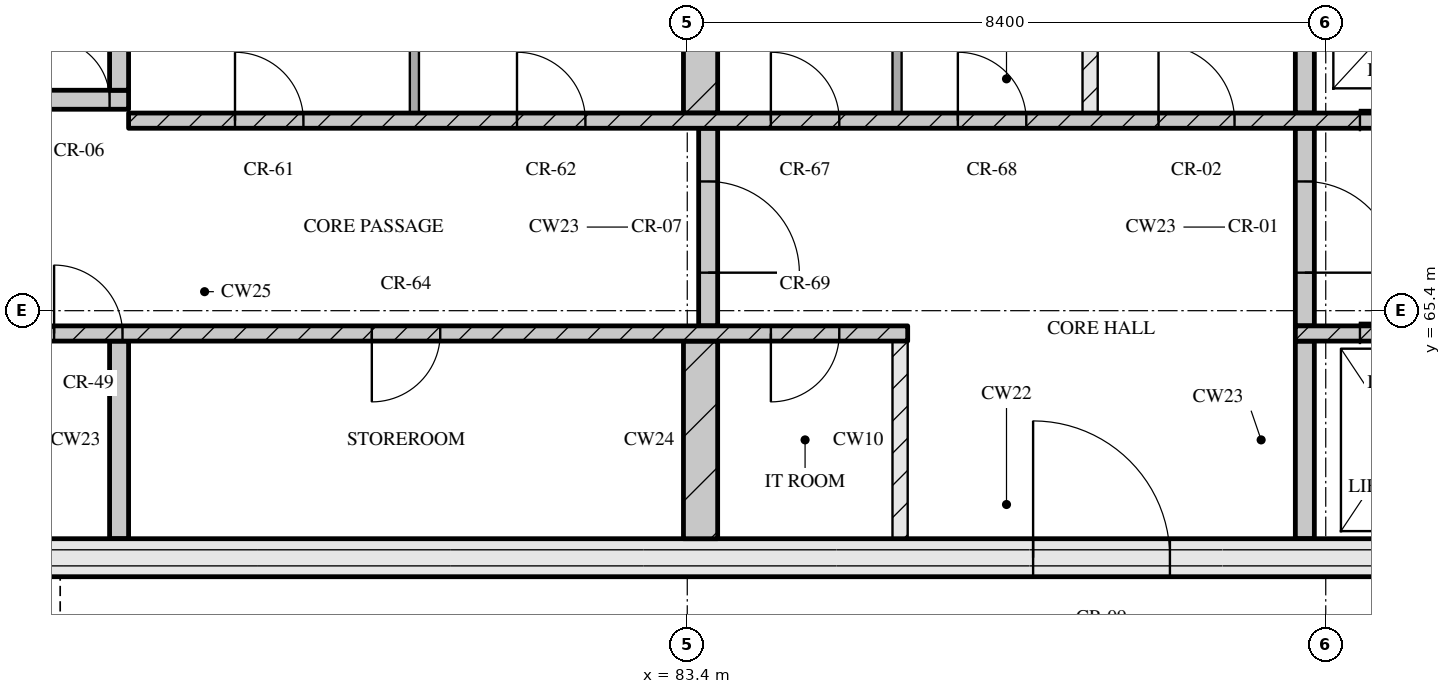
"""IFC4 building model, lengths in metres.
Left out: names, types, materials, properties, quantities, classifications, styles, units other than length and angle.
Written with IfcOpenShell. Run it as: python <this file> out.ifc"""

import sys

from ifc_helpers import new_model, si_unit, direction, frame, frame_2d, origin, place, context, subcontext, project, spatial, rectangle, extrude, element, fill, save


model = new_model("IFC4")
c1 = context("Model", 3, precision=1e-05, world=origin(), true_north=direction((0.0, 1.0)))
c2 = subcontext(c1, "Body", "Model", "MODEL_VIEW")
j1 = project(units=[si_unit("LENGTHUNIT", "METRE"), si_unit("PLANEANGLEUNIT", "RADIAN")], contexts=[c1])
p1 = place(None, origin())
s1 = spatial("IfcSite", under=j1, at=p1, CompositionType="ELEMENT")
p2 = place(p1, origin())
s2 = spatial("IfcBuilding", under=s1, at=p2, CompositionType="ELEMENT")
p3 = place(p2, frame((0.0, 0.0, 303.15)))
s3 = spatial("IfcBuildingStorey", under=s2, at=p3, CompositionType="ELEMENT", Elevation=303.15)
p4 = place(p3, frame((67.3, 62.15, 0.0), z_axis=(0.0, 0.0, 1.0), x_axis=(1.0, 0.0, 0.0)))
e1 = element("IfcWall", 1, at=p4, inside=s3, PredefinedType="SOLIDWALL", context=c2, shape_type="SweptSolid", body=[
    extrude(rectangle(XDim=40.6, YDim=0.5, at=frame_2d((20.3, 0.0))), origin(), (0.0, 0.0, 1.0), 3.32),
])
p5 = place(p4, frame((20.65, 0.0, 0.0)))
e2 = element("IfcOpeningElement", 2, at=p5, cuts=e1, PredefinedType="OPENING", context=c2, shape_type="SweptSolid", body=[
    extrude(rectangle(XDim=1.8, YDim=2.1, at=frame_2d((0.9, 1.05))), frame((0.0, 0.26, 0.0), z_axis=(0.0, -1.0, 0.0), x_axis=(1.0, 0.0, 0.0)), (0.0, 0.0, 1.0), 0.52),
])
p6 = place(p3, frame((75.925, 62.4, 0.0), z_axis=(0.0, 0.0, 1.0), x_axis=(0.0, 1.0, 0.0)))
e3 = element("IfcWall", 3, at=p6, inside=s3, PredefinedType="SOLIDWALL", context=c2, shape_type="SweptSolid", body=[
    extrude(rectangle(XDim=2.6, YDim=0.25, at=frame_2d((1.3, 0.0))), origin(), (0.0, 0.0, 1.0), 3.32),
])
p7 = place(p3, frame((83.575, 62.4, 0.0), z_axis=(0.0, 0.0, 1.0), x_axis=(0.0, 1.0, 0.0)))
e4 = element("IfcWall", 4, at=p7, inside=s3, PredefinedType="SOLIDWALL", context=c2, shape_type="SweptSolid", body=[
    extrude(rectangle(XDim=2.6, YDim=0.45, at=frame_2d((1.3, 0.0))), origin(), (0.0, 0.0, 1.0), 3.32),
])
p8 = place(p3, frame((86.2, 62.4, 0.0), z_axis=(0.0, 0.0, 1.0), x_axis=(0.0, 1.0, 0.0)))
e5 = element("IfcWall", 5, at=p8, inside=s3, PredefinedType="PARTITIONING", context=c2, shape_type="SweptSolid", body=[
    extrude(rectangle(XDim=2.6, YDim=0.2, at=frame_2d((1.3, 0.0))), origin(), (0.0, 0.0, 1.0), 3.32),
])
p9 = place(p3, frame((91.525, 62.4, 0.0), z_axis=(0.0, 0.0, 1.0), x_axis=(0.0, 1.0, 0.0)))
e6 = element("IfcWall", 6, at=p9, inside=s3, PredefinedType="SOLIDWALL", context=c2, shape_type="SweptSolid", body=[
    extrude(rectangle(XDim=2.6, YDim=0.25, at=frame_2d((1.3, 0.0))), origin(), (0.0, 0.0, 1.0), 3.32),
])
p10 = place(p3, frame((67.8, 65.1, 0.0), z_axis=(0.0, 0.0, 1.0), x_axis=(1.0, 0.0, 0.0)))
e7 = element("IfcWall", 7, at=p10, inside=s3, PredefinedType="SOLIDWALL", context=c2, shape_type="SweptSolid", body=[
    extrude(rectangle(XDim=18.5, YDim=0.2, at=frame_2d((9.25, 0.0))), origin(), (0.0, 0.0, 1.0), 3.32),
])
p11 = place(p10, frame((7.27, 0.0, 0.0)))
e8 = element("IfcOpeningElement", 8, at=p11, cuts=e7, PredefinedType="OPENING", context=c2, shape_type="SweptSolid", body=[
    extrude(rectangle(XDim=0.9, YDim=2.1, at=frame_2d((0.45, 1.05))), frame((0.0, 0.11, 0.0), z_axis=(0.0, -1.0, 0.0), x_axis=(1.0, 0.0, 0.0)), (0.0, 0.0, 1.0), 0.22),
])
p12 = place(p10, frame((11.45, 0.0, 0.0)))
e9 = element("IfcOpeningElement", 9, at=p12, cuts=e7, PredefinedType="OPENING", context=c2, shape_type="SweptSolid", body=[
    extrude(rectangle(XDim=0.9, YDim=2.1, at=frame_2d((0.45, 1.05))), frame((0.0, 0.11, 0.0), z_axis=(0.0, -1.0, 0.0), x_axis=(1.0, 0.0, 0.0)), (0.0, 0.0, 1.0), 0.22),
])
p13 = place(p10, frame((16.7, 0.0, 0.0)))
e10 = element("IfcOpeningElement", 10, at=p13, cuts=e7, PredefinedType="OPENING", context=c2, shape_type="SweptSolid", body=[
    extrude(rectangle(XDim=0.9, YDim=2.1, at=frame_2d((0.45, 1.05))), frame((0.0, 0.11, 0.0), z_axis=(0.0, -1.0, 0.0), x_axis=(1.0, 0.0, 0.0)), (0.0, 0.0, 1.0), 0.22),
])
p14 = place(p3, frame((91.4, 65.1, 0.0), z_axis=(0.0, 0.0, 1.0), x_axis=(1.0, 0.0, 0.0)))
e11 = element("IfcWall", 11, at=p14, inside=s3, PredefinedType="SOLIDWALL", context=c2, shape_type="SweptSolid", body=[
    extrude(rectangle(XDim=16.0, YDim=0.2, at=frame_2d((8.0, 0.0))), origin(), (0.0, 0.0, 1.0), 3.32),
])
p15 = place(p14, frame((0.85, 0.0, 0.0)))
e12 = element("IfcOpeningElement", 12, at=p15, cuts=e11, PredefinedType="OPENING", context=c2, shape_type="SweptSolid", body=[
    extrude(rectangle(XDim=1.1, YDim=2.1, at=frame_2d((0.55, 1.05))), frame((0.0, 0.11, 0.0), z_axis=(0.0, -1.0, 0.0), x_axis=(1.0, 0.0, 0.0)), (0.0, 0.0, 1.0), 0.22),
])
p16 = place(p14, frame((3.35, 0.0, 0.0)))
e13 = element("IfcOpeningElement", 13, at=p16, cuts=e11, PredefinedType="OPENING", context=c2, shape_type="SweptSolid", body=[
    extrude(rectangle(XDim=1.1, YDim=2.1, at=frame_2d((0.55, 1.05))), frame((0.0, 0.11, 0.0), z_axis=(0.0, -1.0, 0.0), x_axis=(1.0, 0.0, 0.0)), (0.0, 0.0, 1.0), 0.22),
])
p17 = place(p14, frame((5.85, 0.0, 0.0)))
e14 = element("IfcOpeningElement", 14, at=p17, cuts=e11, PredefinedType="OPENING", context=c2, shape_type="SweptSolid", body=[
    extrude(rectangle(XDim=1.1, YDim=2.1, at=frame_2d((0.55, 1.05))), frame((0.0, 0.11, 0.0), z_axis=(0.0, -1.0, 0.0), x_axis=(1.0, 0.0, 0.0)), (0.0, 0.0, 1.0), 0.22),
])
p18 = place(p14, frame((7.83, 0.0, 0.0)))
e15 = element("IfcOpeningElement", 15, at=p18, cuts=e11, PredefinedType="OPENING", context=c2, shape_type="SweptSolid", body=[
    extrude(rectangle(XDim=0.9, YDim=2.1, at=frame_2d((0.45, 1.05))), frame((0.0, 0.11, 0.0), z_axis=(0.0, -1.0, 0.0), x_axis=(1.0, 0.0, 0.0)), (0.0, 0.0, 1.0), 0.22),
])
p19 = place(p3, frame((83.675, 65.2, 0.0), z_axis=(0.0, 0.0, 1.0), x_axis=(0.0, 1.0, 0.0)))
e16 = element("IfcWall", 16, at=p19, inside=s3, PredefinedType="SOLIDWALL", context=c2, shape_type="SweptSolid", body=[
    extrude(rectangle(XDim=2.6, YDim=0.25, at=frame_2d((1.3, 0.0))), origin(), (0.0, 0.0, 1.0), 3.32),
])
p20 = place(p19, frame((0.7, 0.0, 0.0)))
e17 = element("IfcOpeningElement", 17, at=p20, cuts=e16, PredefinedType="OPENING", context=c2, shape_type="SweptSolid", body=[
    extrude(rectangle(XDim=1.2, YDim=2.1, at=frame_2d((0.6, 1.05))), frame((0.0, 0.135, 0.0), z_axis=(0.0, -1.0, 0.0), x_axis=(1.0, 0.0, 0.0)), (0.0, 0.0, 1.0), 0.27),
])
p21 = place(p3, frame((91.525, 65.2, 0.0), z_axis=(0.0, 0.0, 1.0), x_axis=(0.0, 1.0, 0.0)))
e18 = element("IfcWall", 18, at=p21, inside=s3, PredefinedType="SOLIDWALL", context=c2, shape_type="SweptSolid", body=[
    extrude(rectangle(XDim=2.6, YDim=0.25, at=frame_2d((1.3, 0.0))), origin(), (0.0, 0.0, 1.0), 3.32),
])
p22 = place(p21, frame((0.7, 0.0, 0.0)))
e19 = element("IfcOpeningElement", 19, at=p22, cuts=e18, PredefinedType="OPENING", context=c2, shape_type="SweptSolid", body=[
    extrude(rectangle(XDim=1.2, YDim=2.1, at=frame_2d((0.6, 1.05))), frame((0.0, 0.135, 0.0), z_axis=(0.0, -1.0, 0.0), x_axis=(1.0, 0.0, 0.0)), (0.0, 0.0, 1.0), 0.27),
])
p23 = place(p3, frame((76.05, 67.9, 0.0), z_axis=(0.0, 0.0, 1.0), x_axis=(1.0, 0.0, 0.0)))
e20 = element("IfcWall", 20, at=p23, inside=s3, PredefinedType="SOLIDWALL", context=c2, shape_type="SweptSolid", body=[
    extrude(rectangle(XDim=23.1, YDim=0.2, at=frame_2d((11.55, 0.0))), origin(), (0.0, 0.0, 1.0), 3.32),
])
p24 = place(p23, frame((1.4, 0.0, 0.0)))
e21 = element("IfcOpeningElement", 21, at=p24, cuts=e20, PredefinedType="OPENING", context=c2, shape_type="SweptSolid", body=[
    extrude(rectangle(XDim=0.9, YDim=2.1, at=frame_2d((0.45, 1.05))), frame((0.0, 0.11, 0.0), z_axis=(0.0, -1.0, 0.0), x_axis=(1.0, 0.0, 0.0)), (0.0, 0.0, 1.0), 0.22),
])
p25 = place(p23, frame((5.11, 0.0, 0.0)))
e22 = element("IfcOpeningElement", 22, at=p25, cuts=e20, PredefinedType="OPENING", context=c2, shape_type="SweptSolid", body=[
    extrude(rectangle(XDim=0.9, YDim=2.1, at=frame_2d((0.45, 1.05))), frame((0.0, 0.11, 0.0), z_axis=(0.0, -1.0, 0.0), x_axis=(1.0, 0.0, 0.0)), (0.0, 0.0, 1.0), 0.22),
])
p26 = place(p23, frame((8.45, 0.0, 0.0)))
e23 = element("IfcOpeningElement", 23, at=p26, cuts=e20, PredefinedType="OPENING", context=c2, shape_type="SweptSolid", body=[
    extrude(rectangle(XDim=0.9, YDim=2.1, at=frame_2d((0.45, 1.05))), frame((0.0, 0.11, 0.0), z_axis=(0.0, -1.0, 0.0), x_axis=(1.0, 0.0, 0.0)), (0.0, 0.0, 1.0), 0.22),
])
p27 = place(p23, frame((10.91, 0.0, 0.0)))
e24 = element("IfcOpeningElement", 24, at=p27, cuts=e20, PredefinedType="OPENING", context=c2, shape_type="SweptSolid", body=[
    extrude(rectangle(XDim=0.9, YDim=2.1, at=frame_2d((0.45, 1.05))), frame((0.0, 0.11, 0.0), z_axis=(0.0, -1.0, 0.0), x_axis=(1.0, 0.0, 0.0)), (0.0, 0.0, 1.0), 0.22),
])
p28 = place(p23, frame((13.55, 0.0, 0.0)))
e25 = element("IfcOpeningElement", 25, at=p28, cuts=e20, PredefinedType="OPENING", context=c2, shape_type="SweptSolid", body=[
    extrude(rectangle(XDim=1.0, YDim=2.1, at=frame_2d((0.5, 1.05))), frame((0.0, 0.11, 0.0), z_axis=(0.0, -1.0, 0.0), x_axis=(1.0, 0.0, 0.0)), (0.0, 0.0, 1.0), 0.22),
])
p29 = place(p23, frame((16.2, 0.0, 0.0)))
e26 = element("IfcOpeningElement", 26, at=p29, cuts=e20, PredefinedType="OPENING", context=c2, shape_type="SweptSolid", body=[
    extrude(rectangle(XDim=1.1, YDim=2.1, at=frame_2d((0.55, 1.05))), frame((0.0, 0.11, 0.0), z_axis=(0.0, -1.0, 0.0), x_axis=(1.0, 0.0, 0.0)), (0.0, 0.0, 1.0), 0.22),
])
p30 = place(p23, frame((18.7, 0.0, 0.0)))
e27 = element("IfcOpeningElement", 27, at=p30, cuts=e20, PredefinedType="OPENING", context=c2, shape_type="SweptSolid", body=[
    extrude(rectangle(XDim=1.1, YDim=2.1, at=frame_2d((0.55, 1.05))), frame((0.0, 0.11, 0.0), z_axis=(0.0, -1.0, 0.0), x_axis=(1.0, 0.0, 0.0)), (0.0, 0.0, 1.0), 0.22),
])
p31 = place(p23, frame((21.2, 0.0, 0.0)))
e28 = element("IfcOpeningElement", 28, at=p31, cuts=e20, PredefinedType="OPENING", context=c2, shape_type="SweptSolid", body=[
    extrude(rectangle(XDim=1.1, YDim=2.1, at=frame_2d((0.55, 1.05))), frame((0.0, 0.11, 0.0), z_axis=(0.0, -1.0, 0.0), x_axis=(1.0, 0.0, 0.0)), (0.0, 0.0, 1.0), 0.22),
])
p32 = place(p3, frame((79.81, 68.0, 0.0), z_axis=(0.0, 0.0, 1.0), x_axis=(0.0, 1.0, 0.0)))
e29 = element("IfcWall", 29, at=p32, inside=s3, PredefinedType="PARTITIONING", context=c2, shape_type="SweptSolid", body=[
    extrude(rectangle(XDim=2.6, YDim=0.12, at=frame_2d((1.3, 0.0))), origin(), (0.0, 0.0, 1.0), 3.32),
])
p33 = place(p3, frame((83.575, 68.0, 0.0), z_axis=(0.0, 0.0, 1.0), x_axis=(0.0, 1.0, 0.0)))
e30 = element("IfcWall", 30, at=p33, inside=s3, PredefinedType="SOLIDWALL", context=c2, shape_type="SweptSolid", body=[
    extrude(rectangle(XDim=2.6, YDim=0.45, at=frame_2d((1.3, 0.0))), origin(), (0.0, 0.0, 1.0), 3.32),
])
p34 = place(p3, frame((86.16, 68.0, 0.0), z_axis=(0.0, 0.0, 1.0), x_axis=(0.0, 1.0, 0.0)))
e31 = element("IfcWall", 31, at=p34, inside=s3, PredefinedType="PARTITIONING", context=c2, shape_type="SweptSolid", body=[
    extrude(rectangle(XDim=2.6, YDim=0.12, at=frame_2d((1.3, 0.0))), origin(), (0.0, 0.0, 1.0), 3.32),
])
p35 = place(p3, frame((88.7, 68.0, 0.0), z_axis=(0.0, 0.0, 1.0), x_axis=(0.0, 1.0, 0.0)))
e32 = element("IfcWall", 32, at=p35, inside=s3, PredefinedType="PARTITIONING", context=c2, shape_type="SweptSolid", body=[
    extrude(rectangle(XDim=2.6, YDim=0.2, at=frame_2d((1.3, 0.0))), origin(), (0.0, 0.0, 1.0), 3.32),
])
p36 = place(p3, frame((91.525, 68.0, 0.0), z_axis=(0.0, 0.0, 1.0), x_axis=(0.0, 1.0, 0.0)))
e33 = element("IfcWall", 33, at=p36, inside=s3, PredefinedType="SOLIDWALL", context=c2, shape_type="SweptSolid", body=[
    extrude(rectangle(XDim=2.6, YDim=0.25, at=frame_2d((1.3, 0.0))), origin(), (0.0, 0.0, 1.0), 3.32),
])
p37 = place(p3, frame((67.8, 68.175, 0.0), z_axis=(0.0, 0.0, 1.0), x_axis=(1.0, 0.0, 0.0)))
e34 = element("IfcWall", 34, at=p37, inside=s3, PredefinedType="SOLIDWALL", context=c2, shape_type="SweptSolid", body=[
    extrude(rectangle(XDim=8.25, YDim=0.25, at=frame_2d((4.125, 0.0))), origin(), (0.0, 0.0, 1.0), 3.32),
])
p38 = place(p37, frame((5.7, 0.0, 0.0)))
e35 = element("IfcOpeningElement", 35, at=p38, cuts=e34, PredefinedType="OPENING", context=c2, shape_type="SweptSolid", body=[
    extrude(rectangle(XDim=1.0, YDim=2.1, at=frame_2d((0.5, 1.05))), frame((0.0, 0.135, 0.0), z_axis=(0.0, -1.0, 0.0), x_axis=(1.0, 0.0, 0.0)), (0.0, 0.0, 1.0), 0.27),
])
p39 = place(p37, frame((7.2, 0.0, 0.0)))
e36 = element("IfcOpeningElement", 36, at=p39, cuts=e34, PredefinedType="OPENING", context=c2, shape_type="SweptSolid", body=[
    extrude(rectangle(XDim=0.8, YDim=2.1, at=frame_2d((0.4, 1.05))), frame((0.0, 0.135, 0.0), z_axis=(0.0, -1.0, 0.0), x_axis=(1.0, 0.0, 0.0)), (0.0, 0.0, 1.0), 0.27),
])
p40 = place(p3, frame((75.925, 68.3, 0.0), z_axis=(0.0, 0.0, 1.0), x_axis=(0.0, 1.0, 0.0)))
e37 = element("IfcWall", 37, at=p40, inside=s3, PredefinedType="SOLIDWALL", context=c2, shape_type="SweptSolid", body=[
    extrude(rectangle(XDim=2.3, YDim=0.25, at=frame_2d((1.15, 0.0))), origin(), (0.0, 0.0, 1.0), 3.32),
])
p41 = place(p5, origin())
e38 = element("IfcDoor", 38, at=p41, inside=s3, OperationType="DOUBLE_DOOR_SINGLE_SWING", PredefinedType="DOOR", context=c2, shape_type="SweptSolid", body=[
    extrude(rectangle(XDim=1.8, YDim=2.1, at=frame_2d((0.9, 1.05))), frame((0.0, 0.025, 0.0), z_axis=(0.0, -1.0, 0.0), x_axis=(1.0, 0.0, 0.0)), (0.0, 0.0, 1.0), 0.05),
])
fill(e2, e38)
p42 = place(p11, origin())
e39 = element("IfcDoor", 39, at=p42, inside=s3, OperationType="SINGLE_SWING_LEFT", PredefinedType="DOOR", context=c2, shape_type="SweptSolid", body=[
    extrude(rectangle(XDim=0.9, YDim=2.1, at=frame_2d((0.45, 1.05))), frame((0.0, 0.025, 0.0), z_axis=(0.0, -1.0, 0.0), x_axis=(1.0, 0.0, 0.0)), (0.0, 0.0, 1.0), 0.05),
])
fill(e8, e39)
p43 = place(p12, origin())
e40 = element("IfcDoor", 40, at=p43, inside=s3, OperationType="SINGLE_SWING_RIGHT", PredefinedType="DOOR", context=c2, shape_type="SweptSolid", body=[
    extrude(rectangle(XDim=0.9, YDim=2.1, at=frame_2d((0.45, 1.05))), frame((0.0, 0.025, 0.0), z_axis=(0.0, -1.0, 0.0), x_axis=(1.0, 0.0, 0.0)), (0.0, 0.0, 1.0), 0.05),
])
fill(e9, e40)
p44 = place(p13, origin())
e41 = element("IfcDoor", 41, at=p44, inside=s3, OperationType="SINGLE_SWING_RIGHT", PredefinedType="DOOR", context=c2, shape_type="SweptSolid", body=[
    extrude(rectangle(XDim=0.9, YDim=2.1, at=frame_2d((0.45, 1.05))), frame((0.0, 0.025, 0.0), z_axis=(0.0, -1.0, 0.0), x_axis=(1.0, 0.0, 0.0)), (0.0, 0.0, 1.0), 0.05),
])
fill(e10, e41)
p45 = place(p15, origin())
e42 = element("IfcDoor", 42, at=p45, inside=s3, OperationType="SLIDING_TO_LEFT", PredefinedType="DOOR", context=c2, shape_type="SweptSolid", body=[
    extrude(rectangle(XDim=1.1, YDim=2.1, at=frame_2d((0.55, 1.05))), frame((0.0, 0.025, 0.0), z_axis=(0.0, -1.0, 0.0), x_axis=(1.0, 0.0, 0.0)), (0.0, 0.0, 1.0), 0.05),
])
fill(e12, e42)
p46 = place(p20, origin())
e43 = element("IfcDoor", 43, at=p46, inside=s3, OperationType="SINGLE_SWING_RIGHT", PredefinedType="DOOR", context=c2, shape_type="SweptSolid", body=[
    extrude(rectangle(XDim=1.2, YDim=2.1, at=frame_2d((0.6, 1.05))), frame((0.0, 0.025, 0.0), z_axis=(0.0, -1.0, 0.0), x_axis=(1.0, 0.0, 0.0)), (0.0, 0.0, 1.0), 0.05),
])
fill(e17, e43)
p47 = place(p22, origin())
e44 = element("IfcDoor", 44, at=p47, inside=s3, OperationType="SINGLE_SWING_RIGHT", PredefinedType="DOOR", context=c2, shape_type="SweptSolid", body=[
    extrude(rectangle(XDim=1.2, YDim=2.1, at=frame_2d((0.6, 1.05))), frame((0.0, 0.025, 0.0), z_axis=(0.0, -1.0, 0.0), x_axis=(1.0, 0.0, 0.0)), (0.0, 0.0, 1.0), 0.05),
])
fill(e19, e44)
p48 = place(p24, origin())
e45 = element("IfcDoor", 45, at=p48, inside=s3, OperationType="SINGLE_SWING_LEFT", PredefinedType="DOOR", context=c2, shape_type="SweptSolid", body=[
    extrude(rectangle(XDim=0.9, YDim=2.1, at=frame_2d((0.45, 1.05))), frame((0.0, 0.025, 0.0), z_axis=(0.0, -1.0, 0.0), x_axis=(1.0, 0.0, 0.0)), (0.0, 0.0, 1.0), 0.05),
])
fill(e21, e45)
p49 = place(p25, origin())
e46 = element("IfcDoor", 46, at=p49, inside=s3, OperationType="SINGLE_SWING_LEFT", PredefinedType="DOOR", context=c2, shape_type="SweptSolid", body=[
    extrude(rectangle(XDim=0.9, YDim=2.1, at=frame_2d((0.45, 1.05))), frame((0.0, 0.025, 0.0), z_axis=(0.0, -1.0, 0.0), x_axis=(1.0, 0.0, 0.0)), (0.0, 0.0, 1.0), 0.05),
])
fill(e22, e46)
p50 = place(p26, origin())
e47 = element("IfcDoor", 47, at=p50, inside=s3, OperationType="SINGLE_SWING_LEFT", PredefinedType="DOOR", context=c2, shape_type="SweptSolid", body=[
    extrude(rectangle(XDim=0.9, YDim=2.1, at=frame_2d((0.45, 1.05))), frame((0.0, 0.025, 0.0), z_axis=(0.0, -1.0, 0.0), x_axis=(1.0, 0.0, 0.0)), (0.0, 0.0, 1.0), 0.05),
])
fill(e23, e47)
p51 = place(p27, origin())
e48 = element("IfcDoor", 48, at=p51, inside=s3, OperationType="SINGLE_SWING_LEFT", PredefinedType="DOOR", context=c2, shape_type="SweptSolid", body=[
    extrude(rectangle(XDim=0.9, YDim=2.1, at=frame_2d((0.45, 1.05))), frame((0.0, 0.025, 0.0), z_axis=(0.0, -1.0, 0.0), x_axis=(1.0, 0.0, 0.0)), (0.0, 0.0, 1.0), 0.05),
])
fill(e24, e48)
p52 = place(p28, origin())
e49 = element("IfcDoor", 49, at=p52, inside=s3, OperationType="SINGLE_SWING_LEFT", PredefinedType="DOOR", context=c2, shape_type="SweptSolid", body=[
    extrude(rectangle(XDim=1.0, YDim=2.1, at=frame_2d((0.5, 1.05))), frame((0.0, 0.025, 0.0), z_axis=(0.0, -1.0, 0.0), x_axis=(1.0, 0.0, 0.0)), (0.0, 0.0, 1.0), 0.05),
])
fill(e25, e49)
p53 = place(p29, origin())
e50 = element("IfcDoor", 50, at=p53, inside=s3, OperationType="SLIDING_TO_RIGHT", PredefinedType="DOOR", context=c2, shape_type="SweptSolid", body=[
    extrude(rectangle(XDim=1.1, YDim=2.1, at=frame_2d((0.55, 1.05))), frame((0.0, 0.025, 0.0), z_axis=(0.0, -1.0, 0.0), x_axis=(1.0, 0.0, 0.0)), (0.0, 0.0, 1.0), 0.05),
])
fill(e26, e50)
p54 = place(p39, origin())
e51 = element("IfcDoor", 51, at=p54, inside=s3, OperationType="SINGLE_SWING_LEFT", PredefinedType="DOOR", context=c2, shape_type="SweptSolid", body=[
    extrude(rectangle(XDim=0.8, YDim=2.1, at=frame_2d((0.4, 1.05))), frame((0.0, 0.025, 0.0), z_axis=(0.0, -1.0, 0.0), x_axis=(1.0, 0.0, 0.0)), (0.0, 0.0, 1.0), 0.05),
])
fill(e36, e51)
save(model, sys.argv[1])
